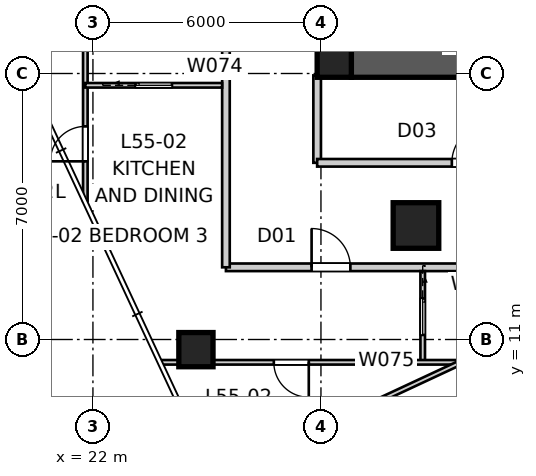
"""IFC4 building model, lengths in metres.
Left out: names, types, materials, properties, quantities, classifications, styles, units other than length and angle.
Written with IfcOpenShell. Run it as: python <this file> out.ifc"""

import sys

from ifc_helpers import new_model, si_unit, direction, frame, frame_2d, origin, origin_2d, place, context, subcontext, project, spatial, polyline, rectangle, outline, extrude, element, fill, save


model = new_model("IFC4")
c1 = context("Model", 3, precision=1e-05, world=origin(), true_north=direction((0.0, 1.0)))
c2 = subcontext(c1, "Body", "Model", "MODEL_VIEW")
j1 = project(units=[si_unit("LENGTHUNIT", "METRE"), si_unit("PLANEANGLEUNIT", "RADIAN")], contexts=[c1])
p1 = place(None, origin())
s1 = spatial("IfcSite", under=j1, at=p1, CompositionType="ELEMENT")
p2 = place(p1, origin())
s2 = spatial("IfcBuilding", under=s1, at=p2, CompositionType="ELEMENT")
p3 = place(p2, frame((0.0, 0.0, 199.8)))
s3 = spatial("IfcBuildingStorey", under=s2, at=p3, CompositionType="ELEMENT", Elevation=199.8)
p4 = place(p3, frame((51.2, 18.35, 0.0), z_axis=(0.0, 0.0, 1.0), x_axis=(-1.0, 0.0, 0.0)))
e1 = element("IfcWall", 1, at=p4, inside=s3, PredefinedType="SHEAR", context=c2, shape_type="SweptSolid", body=[
    extrude(outline(polyline([(0.0, -0.45), (22.4, -0.45), (22.4, -0.025), (22.85, -0.025), (22.85, 0.025), (22.4, 0.025), (22.4, 0.45), (0.0, 0.45), (0.0, 0.025), (-0.45, 0.025), (-0.45, -0.025), (0.0, -0.025), (0.0, -0.45)])), origin(), (0.0, 0.0, 1.0), 3.4),
])
p5 = place(p3, frame((28.35, 41.2, 0.0), z_axis=(0.0, 0.0, 1.0), x_axis=(0.0, -1.0, 0.0)))
e2 = element("IfcWall", 2, at=p5, inside=s3, PredefinedType="SHEAR", context=c2, shape_type="SweptSolid", body=[
    extrude(outline(polyline([(0.0, -0.45), (22.4, -0.45), (22.4, -0.025), (22.85, -0.025), (22.85, 0.025), (22.4, 0.025), (22.4, 0.45), (0.0, 0.45), (0.0, 0.025), (-0.45, 0.025), (-0.45, -0.025), (0.0, -0.025), (0.0, -0.45)])), origin(), (0.0, 0.0, 1.0), 3.4),
])
p6 = place(p5, frame((11.14, 0.0, 0.0)))
e3 = element("IfcOpeningElement", 3, at=p6, cuts=e2, PredefinedType="OPENING", context=c2, shape_type="SweptSolid", body=[
    extrude(rectangle(XDim=1.02, YDim=2.4, at=frame_2d((0.51, 1.2))), frame((0.0, 0.46, 0.0), z_axis=(0.0, -1.0, 0.0), x_axis=(1.0, 0.0, 0.0)), (0.0, 0.0, 1.0), 0.92),
])
p7 = place(p3, frame((28.35, 18.35, 0.0), z_axis=(0.0, 0.0, 1.0), x_axis=(1.0, 0.0, 0.0)))
e4 = element("IfcColumn", 4, at=p7, inside=s3, PredefinedType="COLUMN", context=c2, shape_type="SweptSolid", body=[
    extrude(rectangle(XDim=0.9, YDim=0.9, at=origin_2d()), origin(), (0.0, 0.0, 1.0), 3.4),
])
p8 = place(p3, frame((24.71, 10.733, 0.0), z_axis=(0.0, 0.0, 1.0), x_axis=(1.0, 0.0, 0.0)))
e5 = element("IfcColumn", 5, at=p8, inside=s3, PredefinedType="COLUMN", context=c2, shape_type="SweptSolid", body=[
    extrude(rectangle(XDim=0.9, YDim=0.9, at=origin_2d()), origin(), (0.0, 0.0, 1.0), 3.2),
])
p9 = place(p3, frame((30.5, 14.0, 0.0), z_axis=(0.0, 0.0, 1.0), x_axis=(1.0, 0.0, 0.0)))
e6 = element("IfcColumn", 6, at=p9, inside=s3, PredefinedType="COLUMN", context=c2, shape_type="SweptSolid", body=[
    extrude(rectangle(XDim=1.2, YDim=1.2, at=origin_2d()), origin(), (0.0, 0.0, 1.0), 3.4),
])
p10 = place(p3, frame((25.5, 12.9, 0.0), z_axis=(0.0, 0.0, 1.0), x_axis=(1.0, 0.0, 0.0)))
e7 = element("IfcWall", 7, at=p10, inside=s3, PredefinedType="PARTITIONING", context=c2, shape_type="SweptSolid", body=[
    extrude(rectangle(XDim=8.097, YDim=0.2, at=frame_2d((4.048, 0.0))), origin(), (0.0, 0.0, 1.0), 3.2),
])
p11 = place(p10, frame((2.254, 0.0, 0.0)))
e8 = element("IfcOpeningElement", 8, at=p11, cuts=e7, PredefinedType="OPENING", context=c2, shape_type="SweptSolid", body=[
    extrude(rectangle(XDim=1.02, YDim=2.34, at=frame_2d((0.51, 1.17))), frame((0.0, 0.11, 0.0), z_axis=(0.0, -1.0, 0.0), x_axis=(1.0, 0.0, 0.0)), (0.0, 0.0, 1.0), 0.22),
])
p12 = place(p3, frame((25.5, 46.7, 0.0), z_axis=(0.0, 0.0, 1.0), x_axis=(0.0, -1.0, 0.0)))
e9 = element("IfcWall", 9, at=p12, inside=s3, PredefinedType="PARTITIONING", context=c2, shape_type="SweptSolid", body=[
    extrude(rectangle(XDim=33.8, YDim=0.2, at=frame_2d((16.9, 0.0))), origin(), (0.0, 0.0, 1.0), 3.2),
])
p13 = place(p12, frame((15.349, 0.0, 0.0)))
e10 = element("IfcOpeningElement", 10, at=p13, cuts=e9, PredefinedType="OPENING", context=c2, shape_type="SweptSolid", body=[
    extrude(rectangle(XDim=1.02, YDim=2.34, at=frame_2d((0.51, 1.17))), frame((0.0, 0.11, 0.0), z_axis=(0.0, -1.0, 0.0), x_axis=(1.0, 0.0, 0.0)), (0.0, 0.0, 1.0), 0.22),
])
p14 = place(p3, frame((27.9, 17.95, 0.0), z_axis=(0.0, 0.0, 1.0), x_axis=(0.0, -1.0, 0.0)))
e11 = element("IfcWall", 11, at=p14, inside=s3, PredefinedType="PARTITIONING", context=c2, shape_type="SweptSolid", body=[
    extrude(rectangle(XDim=2.3, YDim=0.2, at=frame_2d((1.15, 0.0))), origin(), (0.0, 0.0, 1.0), 3.2),
])
p15 = place(p3, frame((27.9, 15.65, 0.0), z_axis=(0.0, 0.0, 1.0), x_axis=(1.0, 0.0, 0.0)))
e12 = element("IfcWall", 12, at=p15, inside=s3, PredefinedType="PARTITIONING", context=c2, shape_type="SweptSolid", body=[
    extrude(rectangle(XDim=24.2, YDim=0.2, at=frame_2d((12.1, 0.0))), origin(), (0.0, 0.0, 1.0), 3.2),
])
p16 = place(p15, frame((12.437, 0.0, 0.0)))
e13 = element("IfcOpeningElement", 13, at=p16, cuts=e12, PredefinedType="OPENING", context=c2, shape_type="SweptSolid", body=[
    extrude(rectangle(XDim=1.02, YDim=2.1, at=frame_2d((0.51, 1.05))), frame((0.0, 0.11, 0.0), z_axis=(0.0, -1.0, 0.0), x_axis=(1.0, 0.0, 0.0)), (0.0, 0.0, 1.0), 0.22),
])
p17 = place(p15, frame((3.544, 0.0, 0.0)))
e14 = element("IfcOpeningElement", 14, at=p17, cuts=e12, PredefinedType="OPENING", context=c2, shape_type="SweptSolid", body=[
    extrude(rectangle(XDim=1.02, YDim=2.1, at=frame_2d((0.51, 1.05))), frame((0.0, 0.11, 0.0), z_axis=(0.0, -1.0, 0.0), x_axis=(1.0, 0.0, 0.0)), (0.0, 0.0, 1.0), 0.22),
])
p18 = place(p15, frame((19.883, 0.0, 0.0)))
e15 = element("IfcOpeningElement", 15, at=p18, cuts=e12, PredefinedType="OPENING", context=c2, shape_type="SweptSolid", body=[
    extrude(rectangle(XDim=1.02, YDim=2.1, at=frame_2d((0.51, 1.05))), frame((0.0, 0.11, 0.0), z_axis=(0.0, -1.0, 0.0), x_axis=(1.0, 0.0, 0.0)), (0.0, 0.0, 1.0), 0.22),
])
p19 = place(p3, frame((21.8, 14.647, 0.0), z_axis=(0.0, 0.0, 1.0), x_axis=(0.0, 1.0, 0.0)))
e16 = element("IfcWall", 16, at=p19, inside=s3, PredefinedType="PARTITIONING", context=c2, shape_type="SweptSolid", body=[
    extrude(rectangle(XDim=12.107, YDim=0.12, at=frame_2d((6.053, 0.0))), origin(), (0.0, 0.0, 1.0), 3.2),
])
p20 = place(p19, frame((1.041, 0.0, 0.0)))
e17 = element("IfcOpeningElement", 17, at=p20, cuts=e16, PredefinedType="OPENING", context=c2, shape_type="SweptSolid", body=[
    extrude(rectangle(XDim=0.92, YDim=2.1, at=frame_2d((0.46, 1.05))), frame((0.0, 0.07, 0.0), z_axis=(0.0, -1.0, 0.0), x_axis=(1.0, 0.0, 0.0)), (0.0, 0.0, 1.0), 0.14),
])
p21 = place(p19, frame((9.006, 0.0, 0.0)))
e18 = element("IfcOpeningElement", 18, at=p21, cuts=e16, PredefinedType="OPENING", context=c2, shape_type="SweptSolid", body=[
    extrude(rectangle(XDim=0.96, YDim=2.1, at=frame_2d((0.48, 1.05))), frame((0.0, 0.07, 0.0), z_axis=(0.0, -1.0, 0.0), x_axis=(1.0, 0.0, 0.0)), (0.0, 0.0, 1.0), 0.14),
])
p22 = place(p3, frame((21.8, 17.69, 0.0), z_axis=(0.0, 0.0, 1.0), x_axis=(1.0, 0.0, 0.0)))
e19 = element("IfcWall", 19, at=p22, inside=s3, PredefinedType="PARTITIONING", context=c2, shape_type="SweptSolid", body=[
    extrude(rectangle(XDim=3.6, YDim=0.12, at=frame_2d((1.8, 0.0))), origin(), (0.0, 0.0, 1.0), 3.2),
])
p23 = place(p22, frame((1.32, 0.0, 0.0)))
e20 = element("IfcOpeningElement", 20, at=p23, cuts=e19, PredefinedType="OPENING", context=c2, shape_type="SweptSolid", body=[
    extrude(rectangle(XDim=0.96, YDim=2.1, at=frame_2d((0.48, 1.05))), frame((0.0, 0.07, 0.0), z_axis=(0.0, -1.0, 0.0), x_axis=(1.0, 0.0, 0.0)), (0.0, 0.0, 1.0), 0.14),
])
p24 = place(p3, frame((30.677, 12.8, 0.0), z_axis=(0.0, 0.0, 1.0), x_axis=(0.0, -1.0, 0.0)))
e21 = element("IfcWall", 21, at=p24, inside=s3, PredefinedType="PARTITIONING", context=c2, shape_type="SweptSolid", body=[
    extrude(rectangle(XDim=2.4, YDim=0.12, at=frame_2d((1.2, 0.0))), origin(), (0.0, 0.0, 1.0), 3.2),
])
p25 = place(p24, frame((0.72, 0.0, 0.0)))
e22 = element("IfcOpeningElement", 22, at=p25, cuts=e21, PredefinedType="OPENING", context=c2, shape_type="SweptSolid", body=[
    extrude(rectangle(XDim=0.96, YDim=2.1, at=frame_2d((0.48, 1.05))), frame((0.0, 0.07, 0.0), z_axis=(0.0, -1.0, 0.0), x_axis=(1.0, 0.0, 0.0)), (0.0, 0.0, 1.0), 0.14),
])
p26 = place(p3, frame((49.14, 10.4, 0.0), z_axis=(0.0, 0.0, 1.0), x_axis=(-1.0, 0.0, 0.0)))
e23 = element("IfcWall", 23, at=p26, inside=s3, PredefinedType="PARTITIONING", context=c2, shape_type="SweptSolid", body=[
    extrude(rectangle(XDim=25.333, YDim=0.12, at=frame_2d((12.667, 0.0))), origin(), (0.0, 0.0, 1.0), 3.2),
])
p27 = place(p26, frame((2.188, 0.0, 0.0)))
e24 = element("IfcOpeningElement", 24, at=p27, cuts=e23, PredefinedType="OPENING", context=c2, shape_type="SweptSolid", body=[
    extrude(rectangle(XDim=0.92, YDim=2.34, at=frame_2d((0.46, 1.17))), frame((0.0, 0.07, 0.0), z_axis=(0.0, -1.0, 0.0), x_axis=(1.0, 0.0, 0.0)), (0.0, 0.0, 1.0), 0.14),
])
p28 = place(p26, frame((21.46, 0.0, 0.0)))
e25 = element("IfcOpeningElement", 25, at=p28, cuts=e23, PredefinedType="OPENING", context=c2, shape_type="SweptSolid", body=[
    extrude(rectangle(XDim=0.92, YDim=2.34, at=frame_2d((0.46, 1.17))), frame((0.0, 0.07, 0.0), z_axis=(0.0, -1.0, 0.0), x_axis=(1.0, 0.0, 0.0)), (0.0, 0.0, 1.0), 0.14),
])
p29 = place(p26, frame((8.035, 0.0, 0.0)))
e26 = element("IfcOpeningElement", 26, at=p29, cuts=e23, PredefinedType="OPENING", context=c2, shape_type="SweptSolid", body=[
    extrude(rectangle(XDim=0.96, YDim=2.1, at=frame_2d((0.48, 1.05))), frame((0.0, 0.07, 0.0), z_axis=(0.0, -1.0, 0.0), x_axis=(1.0, 0.0, 0.0)), (0.0, 0.0, 1.0), 0.14),
])
p30 = place(p26, frame((16.14, 0.0, 0.0)))
e27 = element("IfcOpeningElement", 27, at=p30, cuts=e23, PredefinedType="OPENING", context=c2, shape_type="SweptSolid", body=[
    extrude(rectangle(XDim=0.96, YDim=2.1, at=frame_2d((0.48, 1.05))), frame((0.0, 0.07, 0.0), z_axis=(0.0, -1.0, 0.0), x_axis=(1.0, 0.0, 0.0)), (0.0, 0.0, 1.0), 0.14),
])
p31 = place(p26, frame((12.283, 0.0, 0.0)))
e28 = element("IfcOpeningElement", 28, at=p31, cuts=e23, PredefinedType="OPENING", context=c2, shape_type="SweptSolid", body=[
    extrude(rectangle(XDim=0.96, YDim=2.1, at=frame_2d((0.48, 1.05))), frame((0.0, 0.07, 0.0), z_axis=(0.0, -1.0, 0.0), x_axis=(1.0, 0.0, 0.0)), (0.0, 0.0, 1.0), 0.14),
])
p32 = place(p3, frame((25.213, 7.382, 0.0), z_axis=(0.0, 0.0, 1.0), x_axis=(0.906317589158, 0.422597240388, 0.0)))
e29 = element("IfcWall", 29, at=p32, inside=s3, PredefinedType="PARTITIONING", context=c2, shape_type="SweptSolid", body=[
    extrude(rectangle(XDim=7.142, YDim=0.12, at=frame_2d((3.571, 0.0))), origin(), (0.0, 0.0, 1.0), 3.2),
])
p33 = place(p17, origin())
e30 = element("IfcDoor", 30, at=p33, inside=s3, OperationType="SINGLE_SWING_RIGHT", PredefinedType="DOOR", context=c2, shape_type="SweptSolid", body=[
    extrude(rectangle(XDim=1.02, YDim=2.1, at=frame_2d((0.51, 1.05))), frame((0.0, 0.025, 0.0), z_axis=(0.0, -1.0, 0.0), x_axis=(1.0, 0.0, 0.0)), (0.0, 0.0, 1.0), 0.05),
])
fill(e14, e30)
p34 = place(p11, origin())
e31 = element("IfcDoor", 31, at=p34, inside=s3, OperationType="SINGLE_SWING_LEFT", PredefinedType="DOOR", context=c2, shape_type="SweptSolid", body=[
    extrude(rectangle(XDim=1.02, YDim=2.34, at=frame_2d((0.51, 1.17))), frame((0.0, 0.025, 0.0), z_axis=(0.0, -1.0, 0.0), x_axis=(1.0, 0.0, 0.0)), (0.0, 0.0, 1.0), 0.05),
])
fill(e8, e31)
p35 = place(p28, origin())
e32 = element("IfcDoor", 32, at=p35, inside=s3, OperationType="SINGLE_SWING_LEFT", PredefinedType="DOOR", context=c2, shape_type="SweptSolid", body=[
    extrude(rectangle(XDim=0.92, YDim=2.34, at=frame_2d((0.46, 1.17))), frame((0.0, 0.025, 0.0), z_axis=(0.0, -1.0, 0.0), x_axis=(1.0, 0.0, 0.0)), (0.0, 0.0, 1.0), 0.05),
])
fill(e25, e32)
p36 = place(p23, origin())
e33 = element("IfcDoor", 33, at=p36, inside=s3, OperationType="SLIDING_TO_LEFT", PredefinedType="DOOR", context=c2, shape_type="SweptSolid", body=[
    extrude(rectangle(XDim=0.96, YDim=2.1, at=frame_2d((0.48, 1.05))), frame((0.0, 0.025, 0.0), z_axis=(0.0, -1.0, 0.0), x_axis=(1.0, 0.0, 0.0)), (0.0, 0.0, 1.0), 0.05),
])
fill(e20, e33)
p37 = place(p20, origin())
e34 = element("IfcDoor", 34, at=p37, inside=s3, OperationType="SINGLE_SWING_LEFT", PredefinedType="DOOR", context=c2, shape_type="SweptSolid", body=[
    extrude(rectangle(XDim=0.92, YDim=2.1, at=frame_2d((0.46, 1.05))), frame((0.0, 0.025, 0.0), z_axis=(0.0, -1.0, 0.0), x_axis=(1.0, 0.0, 0.0)), (0.0, 0.0, 1.0), 0.05),
])
fill(e17, e34)
p38 = place(p25, origin())
e35 = element("IfcDoor", 35, at=p38, inside=s3, OperationType="SLIDING_TO_LEFT", PredefinedType="DOOR", context=c2, shape_type="SweptSolid", body=[
    extrude(rectangle(XDim=0.96, YDim=2.1, at=frame_2d((0.48, 1.05))), frame((0.0, 0.025, 0.0), z_axis=(0.0, -1.0, 0.0), x_axis=(1.0, 0.0, 0.0)), (0.0, 0.0, 1.0), 0.05),
])
fill(e22, e35)
save(model, sys.argv[1])
